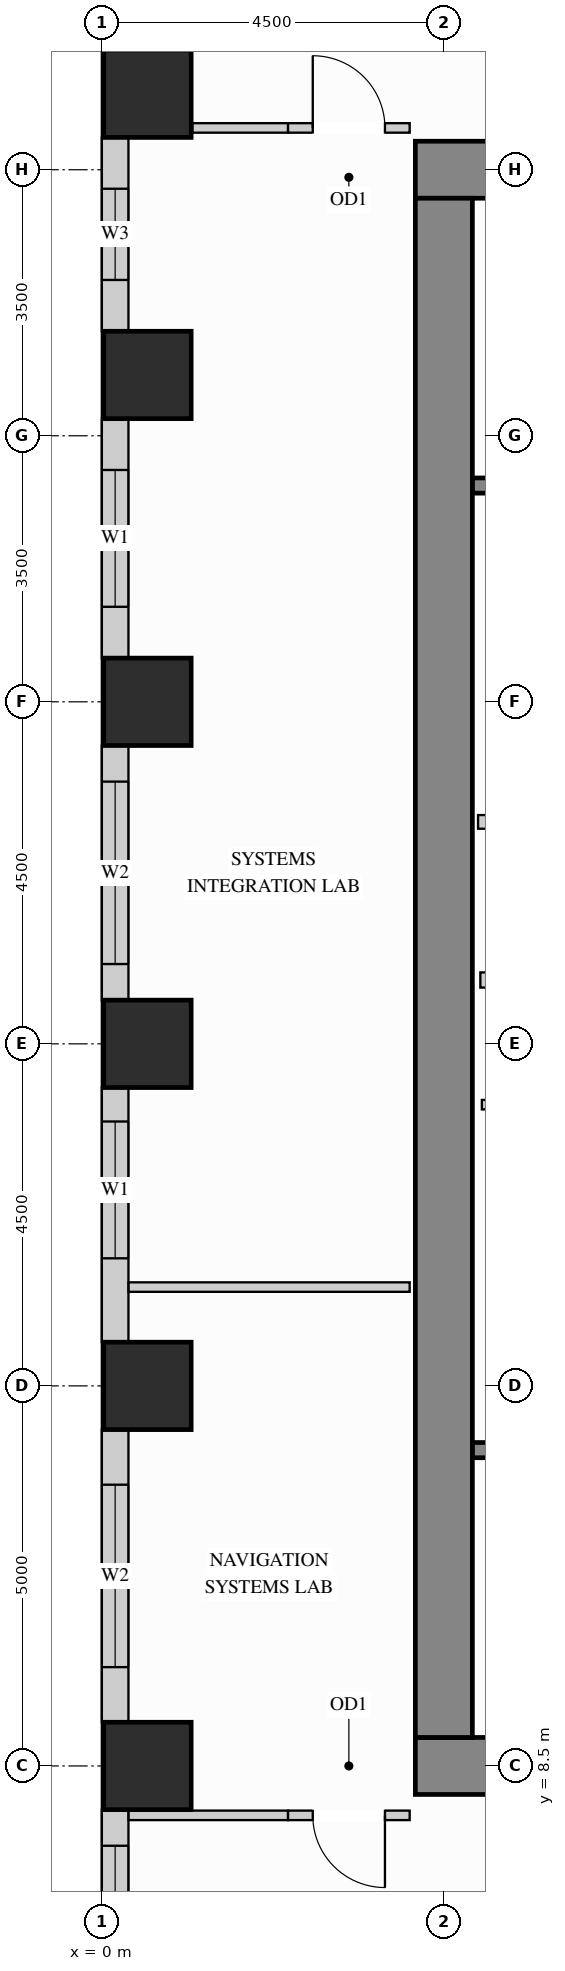
"""IFC4 building model, lengths in metres.
Left out: names, types, materials, properties, quantities, classifications, styles, units other than length and angle.
Written with IfcOpenShell. Run it as: python <this file> out.ifc"""

import sys

from ifc_helpers import new_model, si_unit, direction, frame, frame_2d, origin, origin_2d, place, context, subcontext, project, spatial, rectangle, extrude, source, transform, mapped, element, fill, save


model = new_model("IFC4")
c1 = context("Model", 3, precision=1e-05, world=origin(), true_north=direction((0.0, 1.0)))
c2 = subcontext(c1, "Body", "Model", "MODEL_VIEW")
j1 = project(units=[si_unit("LENGTHUNIT", "METRE"), si_unit("PLANEANGLEUNIT", "RADIAN")], contexts=[c1])
p1 = place(None, origin())
s1 = spatial("IfcSite", under=j1, at=p1, CompositionType="ELEMENT")
p2 = place(p1, origin())
s2 = spatial("IfcBuilding", under=s1, at=p2, CompositionType="ELEMENT")
p3 = place(p2, frame((0.0, 0.0, 127.8)))
s3 = spatial("IfcBuildingStorey", under=s2, at=p3, CompositionType="ELEMENT", Elevation=127.8)
m1 = source(origin(), c2, "Body", "SweptSolid", [
    extrude(rectangle(XDim=1.15, YDim=1.15, at=origin_2d()), origin(), (0.0, 0.0, 1.0), 3.38),
])
for number, where, z_axis, x_axis in (
    (1, (0.6, 13.5, 0.0), (0.0, 0.0, 1.0), (1.0, 0.0, 0.0)),
    (2, (0.6, 18.0, 0.0), (0.0, 0.0, 1.0), (1.0, 0.0, 0.0)),
    (3, (0.6, 22.5, 0.0), (0.0, 0.0, 1.0), (1.0, 0.0, 0.0)),
    (4, (0.6, 26.8, 0.0), (0.0, 0.0, 1.0), (1.0, 0.0, 0.0)),
    (5, (0.6, 30.5, 0.0), (0.0, 0.0, 1.0), (1.0, 0.0, 0.0)),
    (6, (0.6, 8.5, 0.0), (0.0, 0.0, 1.0), (1.0, 0.0, 0.0)),
):
    element("IfcColumn", number, at=place(p3, frame(where, z_axis=z_axis, x_axis=x_axis)), inside=s3, PredefinedType="COLUMN", context=c2, shape_type="MappedRepresentation", body=[
        mapped(m1, transform((0.0, 0.0, 0.0), x_axis=(1.0, 0.0, 0.0), y_axis=(0.0, 1.0, 0.0), z_axis=(0.0, 0.0, 1.0))),
    ])
m2 = source(origin(), c2, "Body", "SweptSolid", [
    extrude(rectangle(XDim=10.75, YDim=0.75, at=frame_2d((5.375, 0.0))), origin(), (0.0, 0.0, 1.0), 3.38),
])
for number, where, z_axis, x_axis in (
    (7, (4.125, 29.5, 0.0), (0.0, 0.0, 1.0), (1.0, 0.0, 0.0)),
    (8, (4.125, 8.5, 0.0), (0.0, 0.0, 1.0), (1.0, 0.0, 0.0)),
):
    element("IfcWall", number, at=place(p3, frame(where, z_axis=z_axis, x_axis=x_axis)), inside=s3, PredefinedType="SHEAR", context=c2, shape_type="MappedRepresentation", body=[
        mapped(m2, transform((0.0, 0.0, 0.0), x_axis=(1.0, 0.0, 0.0), y_axis=(0.0, 1.0, 0.0), z_axis=(0.0, 0.0, 1.0))),
    ])
m3 = source(origin(), c2, "Body", "SweptSolid", [
    extrude(rectangle(XDim=20.25, YDim=0.75, at=frame_2d((10.125, 0.0))), origin(), (0.0, 0.0, 1.0), 3.38),
])
p4 = place(p3, frame((4.5, 8.875, 0.0), z_axis=(0.0, 0.0, 1.0), x_axis=(0.0, 1.0, 0.0)))
e9 = element("IfcWall", 9, at=p4, inside=s3, PredefinedType="SHEAR", context=c2, shape_type="MappedRepresentation", body=[
    mapped(m3, transform((0.0, 0.0, 0.0), x_axis=(1.0, 0.0, 0.0), y_axis=(0.0, 1.0, 0.0), z_axis=(0.0, 0.0, 1.0))),
])
p5 = place(p3, frame((0.175, 29.927, 0.0), z_axis=(0.0, 0.0, 1.0), x_axis=(0.0, -1.0, 0.0)))
e10 = element("IfcWall", 10, at=p5, inside=s3, PredefinedType="SOLIDWALL", context=c2, shape_type="SweptSolid", body=[
    extrude(rectangle(XDim=2.554, YDim=0.35, at=frame_2d((1.277, 0.0))), origin(), (0.0, 0.0, 1.0), 3.365),
])
p6 = place(p5, frame((0.677, 0.0, 0.78)))
e11 = element("IfcOpeningElement", 11, at=p6, cuts=e10, PredefinedType="OPENING", context=c2, shape_type="SweptSolid", body=[
    extrude(rectangle(XDim=1.2, YDim=2.1, at=frame_2d((0.6, 1.05))), frame((0.0, 0.185, 0.0), z_axis=(0.0, -1.0, 0.0), x_axis=(1.0, 0.0, 0.0)), (0.0, 0.0, 1.0), 0.37),
])
p7 = place(p3, frame((0.175, 26.227, 0.0), z_axis=(0.0, 0.0, 1.0), x_axis=(0.0, -1.0, 0.0)))
e12 = element("IfcWall", 12, at=p7, inside=s3, PredefinedType="SOLIDWALL", context=c2, shape_type="SweptSolid", body=[
    extrude(rectangle(XDim=3.154, YDim=0.35, at=frame_2d((1.577, 0.0))), origin(), (0.0, 0.0, 1.0), 3.365),
])
p8 = place(p7, frame((0.677, 0.0, 0.78)))
e13 = element("IfcOpeningElement", 13, at=p8, cuts=e12, PredefinedType="OPENING", context=c2, shape_type="SweptSolid", body=[
    extrude(rectangle(XDim=1.8, YDim=2.1, at=frame_2d((0.9, 1.05))), frame((0.0, 0.185, 0.0), z_axis=(0.0, -1.0, 0.0), x_axis=(1.0, 0.0, 0.0)), (0.0, 0.0, 1.0), 0.37),
])
p9 = place(p3, frame((0.175, 21.927, 0.0), z_axis=(0.0, 0.0, 1.0), x_axis=(0.0, -1.0, 0.0)))
e14 = element("IfcWall", 14, at=p9, inside=s3, PredefinedType="SOLIDWALL", context=c2, shape_type="SweptSolid", body=[
    extrude(rectangle(XDim=3.354, YDim=0.35, at=frame_2d((1.677, 0.0))), origin(), (0.0, 0.0, 1.0), 3.365),
])
p10 = place(p9, frame((0.477, 0.0, 0.78)))
e15 = element("IfcOpeningElement", 15, at=p10, cuts=e14, PredefinedType="OPENING", context=c2, shape_type="SweptSolid", body=[
    extrude(rectangle(XDim=2.4, YDim=2.1, at=frame_2d((1.2, 1.05))), frame((0.0, 0.185, 0.0), z_axis=(0.0, -1.0, 0.0), x_axis=(1.0, 0.0, 0.0)), (0.0, 0.0, 1.0), 0.37),
])
p11 = place(p3, frame((0.175, 17.427, 0.0), z_axis=(0.0, 0.0, 1.0), x_axis=(0.0, -1.0, 0.0)))
e16 = element("IfcWall", 16, at=p11, inside=s3, PredefinedType="SOLIDWALL", context=c2, shape_type="SweptSolid", body=[
    extrude(rectangle(XDim=3.354, YDim=0.35, at=frame_2d((1.677, 0.0))), origin(), (0.0, 0.0, 1.0), 3.365),
])
p12 = place(p11, frame((0.448, 0.0, 0.78)))
e17 = element("IfcOpeningElement", 17, at=p12, cuts=e16, PredefinedType="OPENING", context=c2, shape_type="SweptSolid", body=[
    extrude(rectangle(XDim=1.8, YDim=2.1, at=frame_2d((0.9, 1.05))), frame((0.0, 0.185, 0.0), z_axis=(0.0, -1.0, 0.0), x_axis=(1.0, 0.0, 0.0)), (0.0, 0.0, 1.0), 0.37),
])
p13 = place(p3, frame((0.175, 12.927, 0.0), z_axis=(0.0, 0.0, 1.0), x_axis=(0.0, -1.0, 0.0)))
e18 = element("IfcWall", 18, at=p13, inside=s3, PredefinedType="SOLIDWALL", context=c2, shape_type="SweptSolid", body=[
    extrude(rectangle(XDim=3.854, YDim=0.35, at=frame_2d((1.927, 0.0))), origin(), (0.0, 0.0, 1.0), 3.365),
])
p14 = place(p13, frame((0.727, 0.0, 0.78)))
e19 = element("IfcOpeningElement", 19, at=p14, cuts=e18, PredefinedType="OPENING", context=c2, shape_type="SweptSolid", body=[
    extrude(rectangle(XDim=2.4, YDim=2.1, at=frame_2d((1.2, 1.05))), frame((0.0, 0.185, 0.0), z_axis=(0.0, -1.0, 0.0), x_axis=(1.0, 0.0, 0.0)), (0.0, 0.0, 1.0), 0.37),
])
p15 = place(p3, frame((0.175, 7.927, 0.0), z_axis=(0.0, 0.0, 1.0), x_axis=(0.0, -1.0, 0.0)))
e20 = element("IfcWall", 20, at=p15, inside=s3, PredefinedType="SOLIDWALL", context=c2, shape_type="SweptSolid", body=[
    extrude(rectangle(XDim=3.854, YDim=0.35, at=frame_2d((1.927, 0.0))), origin(), (0.0, 0.0, 1.0), 3.365),
])
p16 = place(p15, frame((0.477, 0.0, 0.78)))
e21 = element("IfcOpeningElement", 21, at=p16, cuts=e20, PredefinedType="OPENING", context=c2, shape_type="SweptSolid", body=[
    extrude(rectangle(XDim=2.4, YDim=2.1, at=frame_2d((1.2, 1.05))), frame((0.0, 0.185, 0.0), z_axis=(0.0, -1.0, 0.0), x_axis=(1.0, 0.0, 0.0)), (0.0, 0.0, 1.0), 0.37),
])
m4 = source(origin(), c2, "Body", "SweptSolid", [
    extrude(rectangle(XDim=2.2, YDim=0.18, at=frame_2d((1.1, 0.0))), origin(), (0.0, 0.0, 1.0), 3.365),
])
p17 = place(p3, frame((4.95, 20.92, 0.0), z_axis=(0.0, 0.0, 1.0), x_axis=(1.0, 0.0, 0.0)))
e22 = element("IfcWall", 22, at=p17, inside=s3, PredefinedType="PARTITIONING", context=c2, shape_type="MappedRepresentation", body=[
    mapped(m4, transform((0.0, 0.0, 0.0), x_axis=(1.0, 0.0, 0.0), y_axis=(0.0, 1.0, 0.0), z_axis=(0.0, 0.0, 1.0))),
])
p18 = place(p3, frame((5.0, 17.2, 0.0), z_axis=(0.0, 0.0, 1.0), x_axis=(1.0, 0.0, 0.0)))
e23 = element("IfcWall", 23, at=p18, inside=s3, PredefinedType="PARTITIONING", context=c2, shape_type="SweptSolid", body=[
    extrude(rectangle(XDim=2.4, YDim=0.125, at=frame_2d((1.2, 0.0))), origin(), (0.0, 0.0, 1.0), 3.365),
])
p19 = place(p18, frame((0.7, 0.0, 0.0)))
e24 = element("IfcOpeningElement", 24, at=p19, cuts=e23, PredefinedType="OPENING", context=c2, shape_type="SweptSolid", body=[
    extrude(rectangle(XDim=0.85, YDim=2.1, at=frame_2d((0.425, 1.05))), frame((0.0, 0.073, 0.0), z_axis=(0.0, -1.0, 0.0), x_axis=(1.0, 0.0, 0.0)), (0.0, 0.0, 1.0), 0.145),
])
m5 = source(origin(), c2, "Body", "SweptSolid", [
    extrude(rectangle(XDim=1.26, YDim=0.125, at=frame_2d((0.63, 0.0))), origin(), (0.0, 0.0, 1.0), 3.365),
])
p20 = place(p3, frame((1.19, 30.05, 0.0), z_axis=(0.0, 0.0, 1.0), x_axis=(1.0, 0.0, 0.0)))
e25 = element("IfcWall", 25, at=p20, inside=s3, PredefinedType="PARTITIONING", context=c2, shape_type="MappedRepresentation", body=[
    mapped(m5, transform((0.0, 0.0, 0.0), x_axis=(1.0, 0.0, 0.0), y_axis=(0.0, 1.0, 0.0), z_axis=(0.0, 0.0, 1.0))),
])
p21 = place(p3, frame((2.45, 30.05, 0.0), z_axis=(0.0, 0.0, 1.0), x_axis=(1.0, 0.0, 0.0)))
e26 = element("IfcWall", 26, at=p21, inside=s3, PredefinedType="PARTITIONING", context=c2, shape_type="SweptSolid", body=[
    extrude(rectangle(XDim=1.6, YDim=0.125, at=frame_2d((0.8, 0.0))), origin(), (0.0, 0.0, 1.0), 3.365),
])
p22 = place(p21, frame((0.325, 0.0, 0.0)))
e27 = element("IfcOpeningElement", 27, at=p22, cuts=e26, PredefinedType="OPENING", context=c2, shape_type="SweptSolid", body=[
    extrude(rectangle(XDim=0.95, YDim=2.15, at=frame_2d((0.475, 1.075))), frame((0.0, 0.073, 0.0), z_axis=(0.0, -1.0, 0.0), x_axis=(1.0, 0.0, 0.0)), (0.0, 0.0, 1.0), 0.145),
])
m6 = source(origin(), c2, "Body", "SweptSolid", [
    extrude(rectangle(XDim=2.098, YDim=0.125, at=frame_2d((1.049, 0.0))), origin(), (0.0, 0.0, 1.0), 3.365),
])
p23 = place(p3, frame((0.352, 7.85, 0.0), z_axis=(0.0, 0.0, 1.0), x_axis=(1.0, 0.0, 0.0)))
e28 = element("IfcWall", 28, at=p23, inside=s3, PredefinedType="PARTITIONING", context=c2, shape_type="MappedRepresentation", body=[
    mapped(m6, transform((0.0, 0.0, 0.0), x_axis=(1.0, 0.0, 0.0), y_axis=(0.0, 1.0, 0.0), z_axis=(0.0, 0.0, 1.0))),
])
p24 = place(p3, frame((2.45, 7.85, 0.0), z_axis=(0.0, 0.0, 1.0), x_axis=(1.0, 0.0, 0.0)))
e29 = element("IfcWall", 29, at=p24, inside=s3, PredefinedType="PARTITIONING", context=c2, shape_type="SweptSolid", body=[
    extrude(rectangle(XDim=1.6, YDim=0.125, at=frame_2d((0.8, 0.0))), origin(), (0.0, 0.0, 1.0), 3.365),
])
p25 = place(p24, frame((0.325, 0.0, 0.0)))
e30 = element("IfcOpeningElement", 30, at=p25, cuts=e29, PredefinedType="OPENING", context=c2, shape_type="SweptSolid", body=[
    extrude(rectangle(XDim=0.95, YDim=2.15, at=frame_2d((0.475, 1.075))), frame((0.0, 0.073, 0.0), z_axis=(0.0, -1.0, 0.0), x_axis=(1.0, 0.0, 0.0)), (0.0, 0.0, 1.0), 0.145),
])
m7 = source(origin(), c2, "Body", "SweptSolid", [
    extrude(rectangle(XDim=3.698, YDim=0.125, at=frame_2d((1.849, 0.0))), origin(), (0.0, 0.0, 1.0), 3.365),
])
p26 = place(p3, frame((0.352, 14.8, 0.0), z_axis=(0.0, 0.0, 1.0), x_axis=(1.0, 0.0, 0.0)))
e31 = element("IfcWall", 31, at=p26, inside=s3, PredefinedType="PARTITIONING", context=c2, shape_type="MappedRepresentation", body=[
    mapped(m7, transform((0.0, 0.0, 0.0), x_axis=(1.0, 0.0, 0.0), y_axis=(0.0, 1.0, 0.0), z_axis=(0.0, 0.0, 1.0))),
])
m8 = source(origin(), c2, "Body", "SweptSolid", [
    extrude(rectangle(XDim=2.09, YDim=0.2, at=frame_2d((1.045, 0.0))), origin(), (0.0, 0.0, 1.0), 3.365),
])
p27 = place(p3, frame((4.98, 18.84, 0.0), z_axis=(0.0, 0.0, 1.0), x_axis=(1.0, 0.0, 0.0)))
e32 = element("IfcWall", 32, at=p27, inside=s3, PredefinedType="PARTITIONING", context=c2, shape_type="MappedRepresentation", body=[
    mapped(m8, transform((0.0, 0.0, 0.0), x_axis=(1.0, 0.0, 0.0), y_axis=(0.0, 1.0, 0.0), z_axis=(0.0, 0.0, 1.0))),
])
p28 = place(p3, frame((4.877, 12.655, 0.0), z_axis=(0.0, 0.0, 1.0), x_axis=(1.0, 0.0, 0.0)))
e33 = element("IfcWall", 33, at=p28, inside=s3, PredefinedType="SHEAR", context=c2, shape_type="SweptSolid", body=[
    extrude(rectangle(XDim=7.528, YDim=0.2, at=frame_2d((3.764, 0.0))), origin(), (0.0, 0.0, 1.0), 3.38),
])
p29 = place(p28, frame((0.4, 0.0, 0.0)))
e34 = element("IfcOpeningElement", 34, at=p29, cuts=e33, PredefinedType="OPENING", context=c2, shape_type="SweptSolid", body=[
    extrude(rectangle(XDim=1.1, YDim=2.15, at=frame_2d((0.55, 1.075))), frame((0.0, 0.11, 0.0), z_axis=(0.0, -1.0, 0.0), x_axis=(1.0, 0.0, 0.0)), (0.0, 0.0, 1.0), 0.22),
])
p30 = place(p3, frame((4.877, 25.345, 0.0), z_axis=(0.0, 0.0, 1.0), x_axis=(1.0, 0.0, 0.0)))
e35 = element("IfcWall", 35, at=p30, inside=s3, PredefinedType="SHEAR", context=c2, shape_type="SweptSolid", body=[
    extrude(rectangle(XDim=7.528, YDim=0.2, at=frame_2d((3.764, 0.0))), origin(), (0.0, 0.0, 1.0), 3.38),
])
p31 = place(p30, frame((0.4, 0.0, 0.0)))
e36 = element("IfcOpeningElement", 36, at=p31, cuts=e35, PredefinedType="OPENING", context=c2, shape_type="SweptSolid", body=[
    extrude(rectangle(XDim=1.1, YDim=2.15, at=frame_2d((0.55, 1.075))), frame((0.0, 0.11, 0.0), z_axis=(0.0, -1.0, 0.0), x_axis=(1.0, 0.0, 0.0)), (0.0, 0.0, 1.0), 0.22),
])
m9 = source(origin(), c2, "Body", "SweptSolid", [
    extrude(rectangle(XDim=0.95, YDim=2.15, at=frame_2d((0.475, 1.075))), frame((0.0, 0.025, 0.0), z_axis=(0.0, -1.0, 0.0), x_axis=(1.0, 0.0, 0.0)), (0.0, 0.0, 1.0), 0.05),
])
p32 = place(p25, origin())
e37 = element("IfcDoor", 37, at=p32, inside=s3, OperationType="SINGLE_SWING_RIGHT", PredefinedType="DOOR", context=c2, shape_type="MappedRepresentation", body=[
    mapped(m9, transform((0.0, 0.0, 0.0), x_axis=(1.0, 0.0, 0.0), y_axis=(0.0, 1.0, 0.0), z_axis=(0.0, 0.0, 1.0))),
])
fill(e30, e37)
p33 = place(p22, origin())
e38 = element("IfcDoor", 38, at=p33, inside=s3, OperationType="SINGLE_SWING_LEFT", PredefinedType="DOOR", context=c2, shape_type="MappedRepresentation", body=[
    mapped(m9, transform((0.0, 0.0, 0.0), x_axis=(1.0, 0.0, 0.0), y_axis=(0.0, 1.0, 0.0), z_axis=(0.0, 0.0, 1.0))),
])
fill(e27, e38)
m10 = source(origin(), c2, "Body", "SweptSolid", [
    extrude(rectangle(XDim=1.8, YDim=2.1, at=frame_2d((0.9, 1.05))), frame((0.0, 0.03, 0.0), z_axis=(0.0, -1.0, 0.0), x_axis=(1.0, 0.0, 0.0)), (0.0, 0.0, 1.0), 0.06),
])
p34 = place(p8, origin())
e39 = element("IfcWindow", 39, at=p34, inside=s3, PartitioningType="SINGLE_PANEL", PredefinedType="WINDOW", context=c2, shape_type="MappedRepresentation", body=[
    mapped(m10, transform((0.0, 0.0, 0.0), x_axis=(1.0, 0.0, 0.0), y_axis=(0.0, 1.0, 0.0), z_axis=(0.0, 0.0, 1.0))),
])
fill(e13, e39)
p35 = place(p12, origin())
e40 = element("IfcWindow", 40, at=p35, inside=s3, PartitioningType="SINGLE_PANEL", PredefinedType="WINDOW", context=c2, shape_type="MappedRepresentation", body=[
    mapped(m10, transform((0.0, 0.0, 0.0), x_axis=(1.0, 0.0, 0.0), y_axis=(0.0, 1.0, 0.0), z_axis=(0.0, 0.0, 1.0))),
])
fill(e17, e40)
m11 = source(origin(), c2, "Body", "SweptSolid", [
    extrude(rectangle(XDim=2.4, YDim=2.1, at=frame_2d((1.2, 1.05))), frame((0.0, 0.03, 0.0), z_axis=(0.0, -1.0, 0.0), x_axis=(1.0, 0.0, 0.0)), (0.0, 0.0, 1.0), 0.06),
])
p36 = place(p10, origin())
e41 = element("IfcWindow", 41, at=p36, inside=s3, PartitioningType="SINGLE_PANEL", PredefinedType="WINDOW", context=c2, shape_type="MappedRepresentation", body=[
    mapped(m11, transform((0.0, 0.0, 0.0), x_axis=(1.0, 0.0, 0.0), y_axis=(0.0, 1.0, 0.0), z_axis=(0.0, 0.0, 1.0))),
])
fill(e15, e41)
p37 = place(p14, origin())
e42 = element("IfcWindow", 42, at=p37, inside=s3, PartitioningType="SINGLE_PANEL", PredefinedType="WINDOW", context=c2, shape_type="MappedRepresentation", body=[
    mapped(m11, transform((0.0, 0.0, 0.0), x_axis=(1.0, 0.0, 0.0), y_axis=(0.0, 1.0, 0.0), z_axis=(0.0, 0.0, 1.0))),
])
fill(e19, e42)
p38 = place(p16, origin())
e43 = element("IfcWindow", 43, at=p38, inside=s3, PartitioningType="SINGLE_PANEL", PredefinedType="WINDOW", context=c2, shape_type="MappedRepresentation", body=[
    mapped(m11, transform((0.0, 0.0, 0.0), x_axis=(1.0, 0.0, 0.0), y_axis=(0.0, 1.0, 0.0), z_axis=(0.0, 0.0, 1.0))),
])
fill(e21, e43)
m12 = source(origin(), c2, "Body", "SweptSolid", [
    extrude(rectangle(XDim=1.2, YDim=2.1, at=frame_2d((0.6, 1.05))), frame((0.0, 0.03, 0.0), z_axis=(0.0, -1.0, 0.0), x_axis=(1.0, 0.0, 0.0)), (0.0, 0.0, 1.0), 0.06),
])
p39 = place(p6, origin())
e44 = element("IfcWindow", 44, at=p39, inside=s3, PartitioningType="SINGLE_PANEL", PredefinedType="WINDOW", context=c2, shape_type="MappedRepresentation", body=[
    mapped(m12, transform((0.0, 0.0, 0.0), x_axis=(1.0, 0.0, 0.0), y_axis=(0.0, 1.0, 0.0), z_axis=(0.0, 0.0, 1.0))),
])
fill(e11, e44)
save(model, sys.argv[1])
